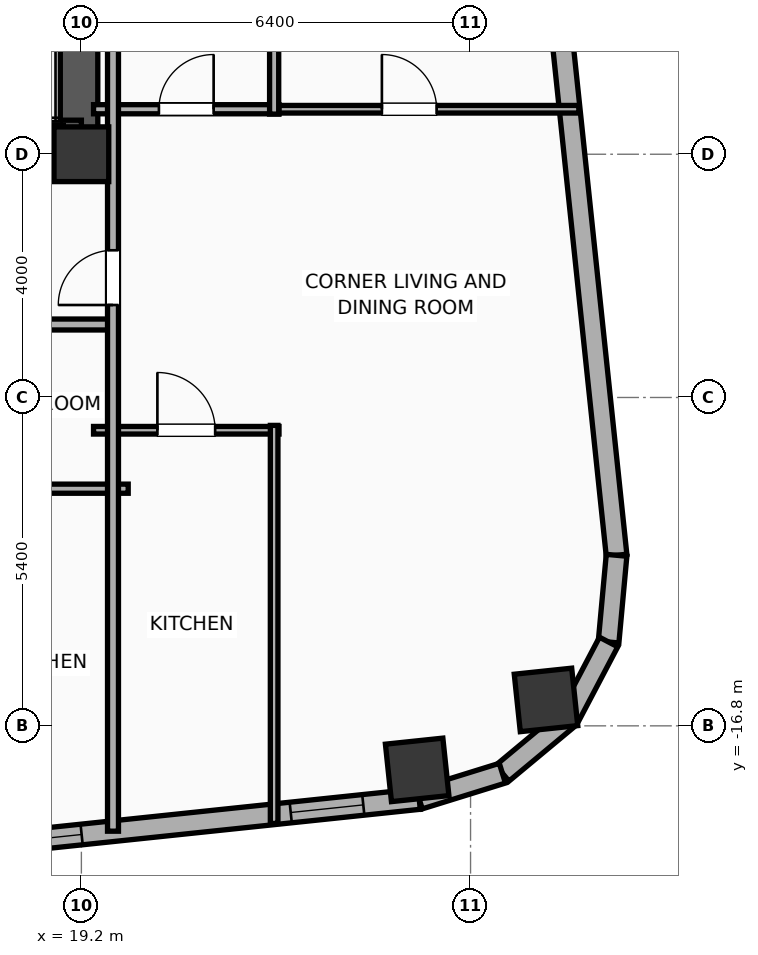
"""IFC4 building model, lengths in metres.
Left out: names, types, materials, properties, quantities, classifications, styles, units other than length and angle.
Written with IfcOpenShell. Run it as: python <this file> out.ifc"""

import sys

from ifc_helpers import new_model, si_unit, direction, frame, frame_2d, origin, origin_2d, place, context, subcontext, project, spatial, rectangle, hollow_rectangle, hollow_circle, extrude, element, fill, save


model = new_model("IFC4")
c1 = context("Model", 3, precision=1e-05, world=origin(), true_north=direction((0.0, 1.0)))
c2 = subcontext(c1, "Body", "Model", "MODEL_VIEW")
j1 = project(units=[si_unit("LENGTHUNIT", "METRE"), si_unit("PLANEANGLEUNIT", "RADIAN")], contexts=[c1])
p1 = place(None, origin())
s1 = spatial("IfcSite", under=j1, at=p1, CompositionType="ELEMENT")
p2 = place(p1, origin())
s2 = spatial("IfcBuilding", under=s1, at=p2, CompositionType="ELEMENT")
p3 = place(p2, frame((0.0, 0.0, 187.2)))
s3 = spatial("IfcBuildingStorey", under=s2, at=p3, CompositionType="ELEMENT", Elevation=187.2)
p4 = place(p3, frame((19.2, -7.4, 0.0), z_axis=(0.0, 0.0, 1.0), x_axis=(1.0, 0.0, 0.0)))
e1 = element("IfcColumn", 1, at=p4, inside=s3, PredefinedType="COLUMN", context=c2, shape_type="SweptSolid", body=[
    extrude(rectangle(XDim=0.9, YDim=0.9, at=origin_2d()), origin(), (0.0, 0.0, 1.0), 3.9),
])
p5 = place(p3, frame((12.175, -7.4, 0.0), z_axis=(0.0, 0.0, 1.0), x_axis=(1.0, 0.0, 0.0)))
e2 = element("IfcWall", 2, at=p5, inside=s3, PredefinedType="SHEAR", context=c2, shape_type="SweptSolid", body=[
    extrude(rectangle(XDim=7.25, YDim=0.45, at=frame_2d((3.625, 0.0))), origin(), (0.0, 0.0, 1.0), 3.65),
])
p6 = place(p3, frame((19.145, -7.4, 0.0), z_axis=(0.0, 0.0, 1.0), x_axis=(0.0, 1.0, 0.0)))
e3 = element("IfcWall", 3, at=p6, inside=s3, PredefinedType="SHEAR", context=c2, shape_type="SweptSolid", body=[
    extrude(rectangle(XDim=14.8, YDim=0.65, at=frame_2d((7.4, 0.0))), origin(), (0.0, 0.0, 1.0), 3.65),
])
p7 = place(p3, frame((15.74, -6.965, 0.0), z_axis=(0.0, 0.0, 1.0), x_axis=(1.0, 0.0, 0.0)))
e4 = element("IfcWall", 4, at=p7, inside=s3, PredefinedType="SOLIDWALL", context=c2, shape_type="SweptSolid", body=[
    extrude(rectangle(XDim=3.46, YDim=0.25, at=frame_2d((1.73, 0.0))), origin(), (0.0, 0.0, 1.0), 3.65),
])
p8 = place(p3, frame((24.722, -17.524, 0.0), z_axis=(0.0, 0.0, 1.0), x_axis=(0.994521895368, 0.104528463268, 0.0)))
e5 = element("IfcColumn", 5, at=p8, inside=s3, PredefinedType="COLUMN", context=c2, shape_type="SweptSolid", body=[
    extrude(hollow_rectangle(XDim=0.95, YDim=0.95, WallThickness=0.032, at=origin_2d()), origin(), (0.0, 0.0, 1.0), 3.9),
])
p9 = place(p3, frame((26.841, -16.374, 0.0), z_axis=(0.0, 0.0, 1.0), x_axis=(0.994521895368, 0.104528463268, 0.0)))
e6 = element("IfcColumn", 6, at=p9, inside=s3, PredefinedType="COLUMN", context=c2, shape_type="SweptSolid", body=[
    extrude(hollow_circle(Radius=0.475, WallThickness=0.032, at=origin_2d()), origin(), (0.0, 0.0, 1.0), 3.9),
])
p10 = place(p3, frame((24.756, -18.003, 0.0), z_axis=(0.0, 0.0, 1.0), x_axis=(-0.99452160744, -0.104531202687, 0.0)))
e7 = element("IfcWall", 7, at=p10, inside=s3, PredefinedType="ELEMENTEDWALL", context=c2, shape_type="SweptSolid", body=[
    extrude(rectangle(XDim=51.967, YDim=0.34, at=frame_2d((25.983, 0.0))), origin(), (0.0, 0.0, 1.0), 3.65),
])
p11 = place(p10, frame((25.633, 0.0, 0.75)))
e8 = element("IfcOpeningElement", 8, at=p11, cuts=e7, PredefinedType="OPENING", context=c2, shape_type="SweptSolid", body=[
    extrude(rectangle(XDim=2.4, YDim=2.1, at=frame_2d((1.2, 1.05))), frame((0.0, 0.18, 0.0), z_axis=(0.0, -1.0, 0.0), x_axis=(1.0, 0.0, 0.0)), (0.0, 0.0, 1.0), 0.36),
])
p12 = place(p10, frame((42.369, 0.0, 0.75)))
e9 = element("IfcOpeningElement", 9, at=p12, cuts=e7, PredefinedType="OPENING", context=c2, shape_type="SweptSolid", body=[
    extrude(rectangle(XDim=1.2, YDim=2.05, at=frame_2d((0.6, 1.025))), frame((0.0, 0.18, 0.0), z_axis=(0.0, -1.0, 0.0), x_axis=(1.0, 0.0, 0.0)), (0.0, 0.0, 1.0), 0.36),
])
p13 = place(p10, frame((34.085, 0.0, 0.75)))
e10 = element("IfcOpeningElement", 10, at=p13, cuts=e7, PredefinedType="OPENING", context=c2, shape_type="SweptSolid", body=[
    extrude(rectangle(XDim=1.2, YDim=2.05, at=frame_2d((0.6, 1.025))), frame((0.0, 0.18, 0.0), z_axis=(0.0, -1.0, 0.0), x_axis=(1.0, 0.0, 0.0)), (0.0, 0.0, 1.0), 0.36),
])
p14 = place(p10, frame((36.993, 0.0, 0.75)))
e11 = element("IfcOpeningElement", 11, at=p14, cuts=e7, PredefinedType="OPENING", context=c2, shape_type="SweptSolid", body=[
    extrude(rectangle(XDim=1.2, YDim=2.05, at=frame_2d((0.6, 1.025))), frame((0.0, 0.18, 0.0), z_axis=(0.0, -1.0, 0.0), x_axis=(1.0, 0.0, 0.0)), (0.0, 0.0, 1.0), 0.36),
])
p15 = place(p10, frame((14.397, 0.0, 0.75)))
e12 = element("IfcOpeningElement", 12, at=p15, cuts=e7, PredefinedType="OPENING", context=c2, shape_type="SweptSolid", body=[
    extrude(rectangle(XDim=1.2, YDim=2.05, at=frame_2d((0.6, 1.025))), frame((0.0, 0.18, 0.0), z_axis=(0.0, -1.0, 0.0), x_axis=(1.0, 0.0, 0.0)), (0.0, 0.0, 1.0), 0.36),
])
p16 = place(p10, frame((11.489, 0.0, 0.75)))
e13 = element("IfcOpeningElement", 13, at=p16, cuts=e7, PredefinedType="OPENING", context=c2, shape_type="SweptSolid", body=[
    extrude(rectangle(XDim=1.2, YDim=2.05, at=frame_2d((0.6, 1.025))), frame((0.0, 0.18, 0.0), z_axis=(0.0, -1.0, 0.0), x_axis=(1.0, 0.0, 0.0)), (0.0, 0.0, 1.0), 0.36),
])
p17 = place(p10, frame((8.521, 0.0, 0.75)))
e14 = element("IfcOpeningElement", 14, at=p17, cuts=e7, PredefinedType="OPENING", context=c2, shape_type="SweptSolid", body=[
    extrude(rectangle(XDim=1.2, YDim=2.05, at=frame_2d((0.6, 1.025))), frame((0.0, 0.18, 0.0), z_axis=(0.0, -1.0, 0.0), x_axis=(1.0, 0.0, 0.0)), (0.0, 0.0, 1.0), 0.36),
])
p18 = place(p10, frame((5.582, 0.0, 0.75)))
e15 = element("IfcOpeningElement", 15, at=p18, cuts=e7, PredefinedType="OPENING", context=c2, shape_type="SweptSolid", body=[
    extrude(rectangle(XDim=1.2, YDim=2.05, at=frame_2d((0.6, 1.025))), frame((0.0, 0.18, 0.0), z_axis=(0.0, -1.0, 0.0), x_axis=(1.0, 0.0, 0.0)), (0.0, 0.0, 1.0), 0.36),
])
p19 = place(p10, frame((29.313, 0.0, 0.75)))
e16 = element("IfcOpeningElement", 16, at=p19, cuts=e7, PredefinedType="OPENING", context=c2, shape_type="SweptSolid", body=[
    extrude(rectangle(XDim=1.2, YDim=2.05, at=frame_2d((0.6, 1.025))), frame((0.0, 0.18, 0.0), z_axis=(0.0, -1.0, 0.0), x_axis=(1.0, 0.0, 0.0)), (0.0, 0.0, 1.0), 0.36),
])
p20 = place(p10, frame((22.248, 0.0, 0.75)))
e17 = element("IfcOpeningElement", 17, at=p20, cuts=e7, PredefinedType="OPENING", context=c2, shape_type="SweptSolid", body=[
    extrude(rectangle(XDim=1.2, YDim=2.05, at=frame_2d((0.6, 1.025))), frame((0.0, 0.18, 0.0), z_axis=(0.0, -1.0, 0.0), x_axis=(1.0, 0.0, 0.0)), (0.0, 0.0, 1.0), 0.36),
])
p21 = place(p10, frame((18.186, 0.0, 0.75)))
e18 = element("IfcOpeningElement", 18, at=p21, cuts=e7, PredefinedType="OPENING", context=c2, shape_type="SweptSolid", body=[
    extrude(rectangle(XDim=1.2, YDim=2.05, at=frame_2d((0.6, 1.025))), frame((0.0, 0.18, 0.0), z_axis=(0.0, -1.0, 0.0), x_axis=(1.0, 0.0, 0.0)), (0.0, 0.0, 1.0), 0.36),
])
p22 = place(p10, frame((47.879, 0.0, 0.75)))
e19 = element("IfcOpeningElement", 19, at=p22, cuts=e7, PredefinedType="OPENING", context=c2, shape_type="SweptSolid", body=[
    extrude(rectangle(XDim=1.2, YDim=2.05, at=frame_2d((0.6, 1.025))), frame((0.0, 0.18, 0.0), z_axis=(0.0, -1.0, 0.0), x_axis=(1.0, 0.0, 0.0)), (0.0, 0.0, 1.0), 0.36),
])
p23 = place(p10, frame((49.844, 0.0, 0.75)))
e20 = element("IfcOpeningElement", 20, at=p23, cuts=e7, PredefinedType="OPENING", context=c2, shape_type="SweptSolid", body=[
    extrude(rectangle(XDim=1.2, YDim=2.05, at=frame_2d((0.6, 1.025))), frame((0.0, 0.18, 0.0), z_axis=(0.0, -1.0, 0.0), x_axis=(1.0, 0.0, 0.0)), (0.0, 0.0, 1.0), 0.36),
])
p24 = place(p10, frame((0.925, 0.0, 0.75)))
e21 = element("IfcOpeningElement", 21, at=p24, cuts=e7, PredefinedType="OPENING", context=c2, shape_type="SweptSolid", body=[
    extrude(rectangle(XDim=1.2, YDim=2.05, at=frame_2d((0.6, 1.025))), frame((0.0, 0.18, 0.0), z_axis=(0.0, -1.0, 0.0), x_axis=(1.0, 0.0, 0.0)), (0.0, 0.0, 1.0), 0.36),
])
p25 = place(p3, frame((24.534, 18.99, 0.0), z_axis=(0.0, 0.0, 1.0), x_axis=(0.104534959766, -0.994521212537, 0.0)))
e22 = element("IfcWall", 22, at=p25, inside=s3, PredefinedType="ELEMENTEDWALL", context=c2, shape_type="SweptSolid", body=[
    extrude(rectangle(XDim=33.166, YDim=0.34, at=frame_2d((16.583, 0.0))), origin(), (0.0, 0.0, 1.0), 3.65),
])
p26 = place(p25, frame((6.542, 0.0, 0.75)))
e23 = element("IfcOpeningElement", 23, at=p26, cuts=e22, PredefinedType="OPENING", context=c2, shape_type="SweptSolid", body=[
    extrude(rectangle(XDim=1.8, YDim=2.1, at=frame_2d((0.9, 1.05))), frame((0.0, 0.18, 0.0), z_axis=(0.0, -1.0, 0.0), x_axis=(1.0, 0.0, 0.0)), (0.0, 0.0, 1.0), 0.36),
])
p27 = place(p25, frame((21.84, 0.0, 0.75)))
e24 = element("IfcOpeningElement", 24, at=p27, cuts=e22, PredefinedType="OPENING", context=c2, shape_type="SweptSolid", body=[
    extrude(rectangle(XDim=1.2, YDim=2.05, at=frame_2d((0.6, 1.025))), frame((0.0, 0.18, 0.0), z_axis=(0.0, -1.0, 0.0), x_axis=(1.0, 0.0, 0.0)), (0.0, 0.0, 1.0), 0.36),
])
p28 = place(p3, frame((28.001, -13.995, 0.0), z_axis=(0.0, 0.0, 1.0), x_axis=(-0.091534682358, -0.995801888894, 0.0)))
e25 = element("IfcWall", 25, at=p28, inside=s3, PredefinedType="ELEMENTEDWALL", context=c2, shape_type="SweptSolid", body=[
    extrude(rectangle(XDim=1.432, YDim=0.34, at=frame_2d((0.716, 0.0))), origin(), (0.0, 0.0, 1.0), 3.65),
])
for number, where, z_axis, x_axis in (
    (26, (27.87, -15.421, 0.0), (0.0, 0.0, 1.0), (-0.466, -0.885, 0.0)),
    (27, (27.211, -16.674, 0.0), (0.0, 0.0, 1.0), (-0.769, -0.64, 0.0)),
):
    element("IfcWall", number, at=place(p3, frame(where, z_axis=z_axis, x_axis=x_axis)), inside=s3, PredefinedType="ELEMENTEDWALL", context=c2, shape_type="SweptSolid", body=[
        extrude(rectangle(XDim=1.415, YDim=0.34, at=frame_2d((0.708, 0.0))), origin(), (0.0, 0.0, 1.0), 3.65),
    ])
p29 = place(p3, frame((26.123, -17.579, 0.0), z_axis=(0.0, 0.0, 1.0), x_axis=(-0.955042500381, -0.296468923271, 0.0)))
e28 = element("IfcWall", 28, at=p29, inside=s3, PredefinedType="ELEMENTEDWALL", context=c2, shape_type="SweptSolid", body=[
    extrude(rectangle(XDim=1.432, YDim=0.34, at=frame_2d((0.716, 0.0))), origin(), (0.0, 0.0, 1.0), 3.65),
])
p30 = place(p3, frame((17.42, -12.9, 0.0), z_axis=(0.0, 0.0, 1.0), x_axis=(1.0, 0.0, 0.0)))
e29 = element("IfcWall", 29, at=p30, inside=s3, PredefinedType="PLUMBINGWALL", context=c2, shape_type="SweptSolid", body=[
    extrude(rectangle(XDim=2.55, YDim=0.15, at=frame_2d((1.275, 0.0))), origin(), (0.0, 0.0, 1.0), 3.65),
])
p31 = place(p3, frame((8.08, -10.2, 0.0), z_axis=(0.0, 0.0, 1.0), x_axis=(1.0, 0.0, 0.0)))
e30 = element("IfcWall", 30, at=p31, inside=s3, PredefinedType="PARTITIONING", context=c2, shape_type="SweptSolid", body=[
    extrude(rectangle(XDim=11.67, YDim=0.18, at=frame_2d((5.835, 0.0))), origin(), (0.0, 0.0, 1.0), 3.65),
])
p32 = place(p31, frame((1.213, 0.0, 0.0)))
e31 = element("IfcOpeningElement", 31, at=p32, cuts=e30, PredefinedType="OPENING", context=c2, shape_type="SweptSolid", body=[
    extrude(rectangle(XDim=1.15, YDim=2.05, at=frame_2d((0.575, 1.025))), frame((0.0, 0.1, 0.0), z_axis=(0.0, -1.0, 0.0), x_axis=(1.0, 0.0, 0.0)), (0.0, 0.0, 1.0), 0.2),
])
p33 = place(p31, frame((7.057, 0.0, 0.0)))
e32 = element("IfcOpeningElement", 32, at=p33, cuts=e30, PredefinedType="OPENING", context=c2, shape_type="SweptSolid", body=[
    extrude(rectangle(XDim=1.15, YDim=2.05, at=frame_2d((0.575, 1.025))), frame((0.0, 0.1, 0.0), z_axis=(0.0, -1.0, 0.0), x_axis=(1.0, 0.0, 0.0)), (0.0, 0.0, 1.0), 0.2),
])
p34 = place(p3, frame((22.31, -6.66, 0.0), z_axis=(0.0, 0.0, 1.0), x_axis=(1.0, 0.0, 0.0)))
e33 = element("IfcWall", 33, at=p34, inside=s3, PredefinedType="PARTITIONING", context=c2, shape_type="SweptSolid", body=[
    extrude(rectangle(XDim=5.071, YDim=0.125, at=frame_2d((2.536, 0.0))), origin(), (0.0, 0.0, 1.0), 3.65),
])
p35 = place(p34, frame((1.832, 0.0, 0.0)))
e34 = element("IfcOpeningElement", 34, at=p35, cuts=e33, PredefinedType="OPENING", context=c2, shape_type="SweptSolid", body=[
    extrude(rectangle(XDim=0.9, YDim=2.05, at=frame_2d((0.45, 1.025))), frame((0.0, 0.073, 0.0), z_axis=(0.0, -1.0, 0.0), x_axis=(1.0, 0.0, 0.0)), (0.0, 0.0, 1.0), 0.145),
])
p36 = place(p3, frame((19.4, -11.939, 0.0), z_axis=(0.0, 0.0, 1.0), x_axis=(1.0, 0.0, 0.0)))
e35 = element("IfcWall", 35, at=p36, inside=s3, PredefinedType="PARTITIONING", context=c2, shape_type="SweptSolid", body=[
    extrude(rectangle(XDim=3.05, YDim=0.125, at=frame_2d((1.525, 0.0))), origin(), (0.0, 0.0, 1.0), 3.65),
])
p37 = place(p36, frame((1.05, 0.0, 0.0)))
e36 = element("IfcOpeningElement", 36, at=p37, cuts=e35, PredefinedType="OPENING", context=c2, shape_type="SweptSolid", body=[
    extrude(rectangle(XDim=0.95, YDim=2.05, at=frame_2d((0.475, 1.025))), frame((0.0, 0.073, 0.0), z_axis=(0.0, -1.0, 0.0), x_axis=(1.0, 0.0, 0.0)), (0.0, 0.0, 1.0), 0.145),
])
p38 = place(p3, frame((19.4, -6.66, 0.0), z_axis=(0.0, 0.0, 1.0), x_axis=(1.0, 0.0, 0.0)))
e37 = element("IfcWall", 37, at=p38, inside=s3, PredefinedType="PLUMBINGWALL", context=c2, shape_type="SweptSolid", body=[
    extrude(rectangle(XDim=3.05, YDim=0.15, at=frame_2d((1.525, 0.0))), origin(), (0.0, 0.0, 1.0), 3.04),
])
p39 = place(p38, frame((1.075, 0.0, 0.0)))
e38 = element("IfcOpeningElement", 38, at=p39, cuts=e37, PredefinedType="OPENING", context=c2, shape_type="SweptSolid", body=[
    extrude(rectangle(XDim=0.9, YDim=2.05, at=frame_2d((0.45, 1.025))), frame((0.0, 0.085, 0.0), z_axis=(0.0, -1.0, 0.0), x_axis=(1.0, 0.0, 0.0)), (0.0, 0.0, 1.0), 0.17),
])
p40 = place(p3, frame((22.37, -18.405, 0.0), z_axis=(0.0, 0.0, 1.0), x_axis=(0.0, 1.0, 0.0)))
e39 = element("IfcWall", 39, at=p40, inside=s3, PredefinedType="PARTITIONING", context=c2, shape_type="SweptSolid", body=[
    extrude(rectangle(XDim=6.546, YDim=0.125, at=frame_2d((3.273, 0.0))), origin(), (0.0, 0.0, 1.0), 3.65),
])
p41 = place(p3, frame((22.37, -6.74, 0.0), z_axis=(0.0, 0.0, 1.0), x_axis=(0.0, 1.0, 0.0)))
e40 = element("IfcWall", 40, at=p41, inside=s3, PredefinedType="PLUMBINGWALL", context=c2, shape_type="SweptSolid", body=[
    extrude(rectangle(XDim=6.72, YDim=0.15, at=frame_2d((3.36, 0.0))), origin(), (0.0, 0.0, 1.0), 3.65),
])
p42 = place(p3, frame((19.72, -18.532, 0.0), z_axis=(0.0, 0.0, 1.0), x_axis=(0.0, 1.0, 0.0)))
e41 = element("IfcWall", 41, at=p42, inside=s3, PredefinedType="PARTITIONING", context=c2, shape_type="SweptSolid", body=[
    extrude(rectangle(XDim=18.532, YDim=0.18, at=frame_2d((9.266, 0.0))), origin(), (0.0, 0.0, 1.0), 3.65),
])
p43 = place(p42, frame((8.653, 0.0, 0.0)))
e42 = element("IfcOpeningElement", 42, at=p43, cuts=e41, PredefinedType="OPENING", context=c2, shape_type="SweptSolid", body=[
    extrude(rectangle(XDim=0.9, YDim=2.05, at=frame_2d((0.45, 1.025))), frame((0.0, 0.1, 0.0), z_axis=(0.0, -1.0, 0.0), x_axis=(1.0, 0.0, 0.0)), (0.0, 0.0, 1.0), 0.2),
])
p44 = place(p18, origin())
e43 = element("IfcWindow", 43, at=p44, inside=s3, PartitioningType="SINGLE_PANEL", PredefinedType="WINDOW", context=c2, shape_type="SweptSolid", body=[
    extrude(rectangle(XDim=1.2, YDim=2.05, at=frame_2d((0.6, 1.025))), frame((0.0, 0.03, 0.0), z_axis=(0.0, -1.0, 0.0), x_axis=(1.0, 0.0, 0.0)), (0.0, 0.0, 1.0), 0.06),
])
fill(e15, e43)
p45 = place(p24, origin())
e44 = element("IfcWindow", 44, at=p45, inside=s3, PartitioningType="SINGLE_PANEL", PredefinedType="WINDOW", context=c2, shape_type="SweptSolid", body=[
    extrude(rectangle(XDim=1.2, YDim=2.05, at=frame_2d((0.6, 1.025))), frame((0.0, 0.03, 0.0), z_axis=(0.0, -1.0, 0.0), x_axis=(1.0, 0.0, 0.0)), (0.0, 0.0, 1.0), 0.06),
])
fill(e21, e44)
p46 = place(p35, origin())
e45 = element("IfcDoor", 45, at=p46, inside=s3, OperationType="SINGLE_SWING_LEFT", PredefinedType="DOOR", context=c2, shape_type="SweptSolid", body=[
    extrude(rectangle(XDim=0.9, YDim=2.05, at=frame_2d((0.45, 1.025))), frame((0.0, 0.025, 0.0), z_axis=(0.0, -1.0, 0.0), x_axis=(1.0, 0.0, 0.0)), (0.0, 0.0, 1.0), 0.05),
])
fill(e34, e45)
p47 = place(p37, origin())
e46 = element("IfcDoor", 46, at=p47, inside=s3, OperationType="SINGLE_SWING_LEFT", PredefinedType="DOOR", context=c2, shape_type="SweptSolid", body=[
    extrude(rectangle(XDim=0.95, YDim=2.05, at=frame_2d((0.475, 1.025))), frame((0.0, 0.025, 0.0), z_axis=(0.0, -1.0, 0.0), x_axis=(1.0, 0.0, 0.0)), (0.0, 0.0, 1.0), 0.05),
])
fill(e36, e46)
p48 = place(p39, origin())
e47 = element("IfcDoor", 47, at=p48, inside=s3, OperationType="SINGLE_SWING_RIGHT", PredefinedType="DOOR", context=c2, shape_type="SweptSolid", body=[
    extrude(rectangle(XDim=0.9, YDim=2.05, at=frame_2d((0.45, 1.025))), frame((0.0, 0.025, 0.0), z_axis=(0.0, -1.0, 0.0), x_axis=(1.0, 0.0, 0.0)), (0.0, 0.0, 1.0), 0.05),
])
fill(e38, e47)
p49 = place(p43, origin())
e48 = element("IfcDoor", 48, at=p49, inside=s3, OperationType="SINGLE_SWING_LEFT", PredefinedType="DOOR", context=c2, shape_type="SweptSolid", body=[
    extrude(rectangle(XDim=0.9, YDim=2.05, at=frame_2d((0.45, 1.025))), frame((0.0, 0.025, 0.0), z_axis=(0.0, -1.0, 0.0), x_axis=(1.0, 0.0, 0.0)), (0.0, 0.0, 1.0), 0.05),
])
fill(e42, e48)
save(model, sys.argv[1])
